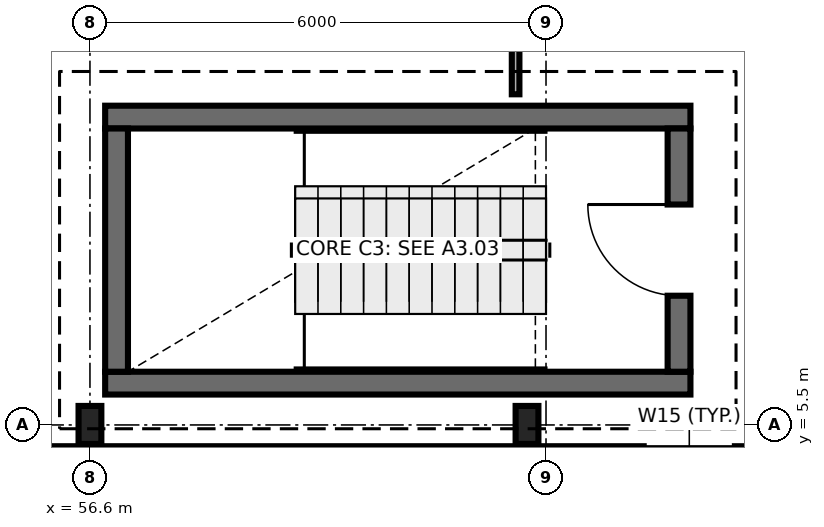
"""IFC4 building model, lengths in metres.
Left out: names, types, materials, properties, quantities, classifications, styles, units other than length and angle.
Written with IfcOpenShell. Run it as: python <this file> out.ifc"""

import sys

from ifc_helpers import new_model, si_unit, direction, frame, frame_2d, origin, origin_2d, place, context, subcontext, project, spatial, rectangle, i_section, extrude, element, fill, save


model = new_model("IFC4")
c1 = context("Model", 3, precision=1e-05, world=origin(), true_north=direction((0.0, 1.0)))
c2 = subcontext(c1, "Body", "Model", "MODEL_VIEW")
j1 = project(units=[si_unit("LENGTHUNIT", "METRE"), si_unit("PLANEANGLEUNIT", "RADIAN")], contexts=[c1])
p1 = place(None, origin())
s1 = spatial("IfcSite", under=j1, at=p1, CompositionType="ELEMENT")
p2 = place(p1, origin())
s2 = spatial("IfcBuilding", under=s1, at=p2, CompositionType="ELEMENT")
p3 = place(p2, frame((0.0, 0.0, 9.3)))
s3 = spatial("IfcBuildingStorey", under=s2, at=p3, CompositionType="ELEMENT", Elevation=9.3)
for number, where, z_axis, x_axis in (
    (1, (56.6, 5.5, 0.0), (0.0, 0.0, 1.0), (1.0, 0.0, 0.0)),
    (2, (62.35, 5.5, 0.0), (0.0, 0.0, 1.0), (1.0, 0.0, 0.0)),
):
    element("IfcColumn", number, at=place(p3, frame(where, z_axis=z_axis, x_axis=x_axis)), inside=s3, PredefinedType="COLUMN", context=c2, shape_type="SweptSolid", body=[
        extrude(i_section(OverallWidth=0.3, OverallDepth=0.5, WebThickness=0.014, FlangeThickness=0.028, FilletRadius=0.027, at=origin_2d()), origin(), (0.0, 0.0, 1.0), 4.5),
    ])
for number, where, z_axis, x_axis in (
    (3, (56.8, 6.05, 0.0), (0.0, 0.0, 1.0), (1.0, 0.0, 0.0)),
    (4, (64.5, 9.55, 0.0), (0.0, 0.0, 1.0), (-1.0, 0.0, 0.0)),
):
    element("IfcWall", number, at=place(p3, frame(where, z_axis=z_axis, x_axis=x_axis)), inside=s3, PredefinedType="SHEAR", context=c2, shape_type="SweptSolid", body=[
        extrude(rectangle(XDim=7.7, YDim=0.3, at=frame_2d((3.85, 0.0))), origin(), (0.0, 0.0, 1.0), 4.5),
    ])
p4 = place(p3, frame((56.95, 9.4, 0.0), z_axis=(0.0, 0.0, 1.0), x_axis=(0.0, -1.0, 0.0)))
e5 = element("IfcWall", 5, at=p4, inside=s3, PredefinedType="SHEAR", context=c2, shape_type="SweptSolid", body=[
    extrude(rectangle(XDim=3.2, YDim=0.3, at=frame_2d((1.6, 0.0))), origin(), (0.0, 0.0, 1.0), 4.5),
])
p5 = place(p3, frame((64.35, 6.2, 0.0), z_axis=(0.0, 0.0, 1.0), x_axis=(0.0, 1.0, 0.0)))
e6 = element("IfcWall", 6, at=p5, inside=s3, PredefinedType="SHEAR", context=c2, shape_type="SweptSolid", body=[
    extrude(rectangle(XDim=3.2, YDim=0.3, at=frame_2d((1.6, 0.0))), origin(), (0.0, 0.0, 1.0), 4.5),
])
p6 = place(p5, frame((1.0, 0.0, 0.0)))
e7 = element("IfcOpeningElement", 7, at=p6, cuts=e6, PredefinedType="OPENING", context=c2, shape_type="SweptSolid", body=[
    extrude(rectangle(XDim=1.2, YDim=2.15, at=frame_2d((0.6, 1.075))), frame((0.0, 0.16, 0.0), z_axis=(0.0, -1.0, 0.0), x_axis=(1.0, 0.0, 0.0)), (0.0, 0.0, 1.0), 0.32),
])
p7 = place(p3, frame((55.002, 5.06, 0.0), z_axis=(0.0, 0.0, 1.0), x_axis=(1.0, 0.0, 0.0)))
e8 = element("IfcWall", 8, at=p7, inside=s3, PredefinedType="SHEAR", context=c2, shape_type="SweptSolid", body=[
    extrude(rectangle(XDim=12.299, YDim=0.32, at=frame_2d((6.149, 0.0))), origin(), (0.0, 0.0, 1.0), 4.25),
])
p8 = place(p7, frame((8.883, 0.0, 0.9)))
e9 = element("IfcOpeningElement", 9, at=p8, cuts=e8, PredefinedType="OPENING", context=c2, shape_type="SweptSolid", body=[
    extrude(rectangle(XDim=1.2, YDim=1.5, at=frame_2d((0.6, 0.75))), frame((0.0, 0.17, 0.0), z_axis=(0.0, -1.0, 0.0), x_axis=(1.0, 0.0, 0.0)), (0.0, 0.0, 1.0), 0.34),
])
p9 = place(p3, frame((62.2, 9.85, 0.0), z_axis=(0.0, 0.0, 1.0), x_axis=(0.0, 1.0, 0.0)))
e10 = element("IfcWall", 10, at=p9, inside=s3, PredefinedType="PARTITIONING", context=c2, shape_type="SweptSolid", body=[
    extrude(rectangle(XDim=31.4, YDim=0.1, at=frame_2d((15.7, 0.0))), origin(), (0.0, 0.0, 1.0), 4.25),
])
p10 = place(p9, frame((9.753, 0.0, 0.0)))
e11 = element("IfcOpeningElement", 11, at=p10, cuts=e10, PredefinedType="OPENING", context=c2, shape_type="SweptSolid", body=[
    extrude(rectangle(XDim=0.95, YDim=2.1, at=frame_2d((0.475, 1.05))), frame((0.0, 0.06, 0.0), z_axis=(0.0, -1.0, 0.0), x_axis=(1.0, 0.0, 0.0)), (0.0, 0.0, 1.0), 0.12),
])
p11 = place(p9, frame((21.837, 0.0, 0.0)))
e12 = element("IfcOpeningElement", 12, at=p11, cuts=e10, PredefinedType="OPENING", context=c2, shape_type="SweptSolid", body=[
    extrude(rectangle(XDim=1.1, YDim=2.15, at=frame_2d((0.55, 1.075))), frame((0.0, 0.06, 0.0), z_axis=(0.0, -1.0, 0.0), x_axis=(1.0, 0.0, 0.0)), (0.0, 0.0, 1.0), 0.12),
])
p12 = place(p6, origin())
e13 = element("IfcDoor", 13, at=p12, inside=s3, OperationType="SINGLE_SWING_RIGHT", PredefinedType="DOOR", context=c2, shape_type="SweptSolid", body=[
    extrude(rectangle(XDim=1.2, YDim=2.15, at=frame_2d((0.6, 1.075))), frame((0.0, 0.025, 0.0), z_axis=(0.0, -1.0, 0.0), x_axis=(1.0, 0.0, 0.0)), (0.0, 0.0, 1.0), 0.05),
])
fill(e7, e13)
save(model, sys.argv[1])
